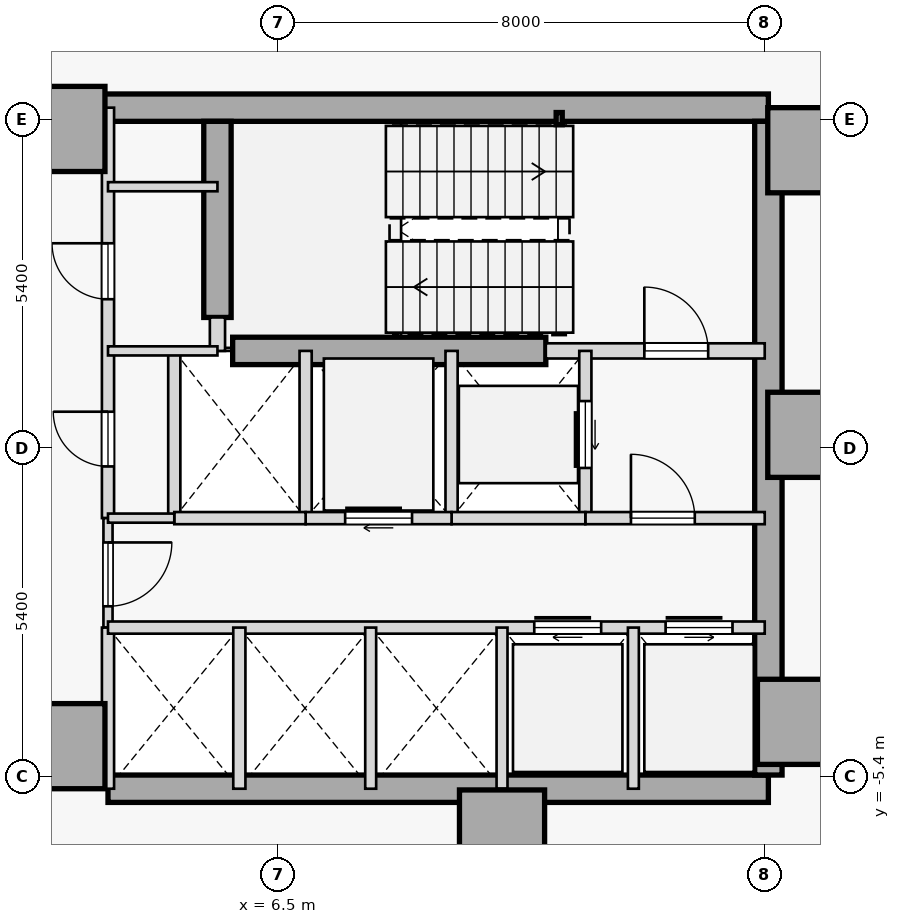
"""IFC4 building model, lengths in metres.
Left out: names, types, materials, properties, quantities, classifications, styles, units other than length and angle.
Written with IfcOpenShell. Run it as: python <this file> out.ifc"""

import sys

from ifc_helpers import new_model, si_unit, direction, frame, frame_2d, origin, origin_2d, place, context, subcontext, project, spatial, rectangle, hollow_rectangle, extrude, element, fill, save


model = new_model("IFC4")
c1 = context("Model", 3, precision=1e-05, world=origin(), true_north=direction((0.0, 1.0)))
c2 = subcontext(c1, "Body", "Model", "MODEL_VIEW")
j1 = project(units=[si_unit("LENGTHUNIT", "METRE"), si_unit("PLANEANGLEUNIT", "RADIAN")], contexts=[c1])
p1 = place(None, origin())
s1 = spatial("IfcSite", under=j1, at=p1, CompositionType="ELEMENT")
p2 = place(p1, origin())
s2 = spatial("IfcBuilding", under=s1, at=p2, CompositionType="ELEMENT")
p3 = place(p2, frame((0.0, 0.0, 21.8)))
s3 = spatial("IfcBuildingStorey", under=s2, at=p3, CompositionType="ELEMENT", Elevation=21.8)
for number, where, z_axis, x_axis in (
    (1, (15.25, 4.9, 0.0), (0.0, 0.0, 1.0), (1.0, 0.0, 0.0)),
    (2, (15.25, 0.22, 0.0), (0.0, 0.0, 1.0), (1.0, 0.0, 0.0)),
    (3, (15.08, -4.5, 0.0), (0.0, 0.0, 1.0), (1.0, 0.0, 0.0)),
    (4, (10.18, -6.32, 0.0), (0.0, 0.0, 1.0), (1.0, 0.0, 0.0)),
    (5, (2.95, -4.9, 0.0), (0.0, 0.0, 1.0), (1.0, 0.0, 0.0)),
    (6, (2.95, 5.25, 0.0), (0.0, 0.0, 1.0), (1.0, 0.0, 0.0)),
):
    element("IfcColumn", number, at=place(p3, frame(where, z_axis=z_axis, x_axis=x_axis)), inside=s3, PredefinedType="COLUMN", context=c2, shape_type="SweptSolid", body=[
        extrude(rectangle(XDim=1.4, YDim=1.4, at=origin_2d()), origin(), (0.0, 0.0, 1.0), 3.8),
    ])
p4 = place(p3, frame((3.15, 5.6, 0.0), z_axis=(0.0, 0.0, 1.0), x_axis=(1.0, 0.0, 0.0)))
e7 = element("IfcWall", 7, at=p4, inside=s3, PredefinedType="SHEAR", context=c2, shape_type="SweptSolid", body=[
    extrude(rectangle(XDim=11.41, YDim=0.45, at=frame_2d((5.705, 0.0))), origin(), (0.0, 0.0, 1.0), 3.575),
])
p5 = place(p3, frame((3.7, -5.6, 0.0), z_axis=(0.0, 0.0, 1.0), x_axis=(1.0, 0.0, 0.0)))
e8 = element("IfcWall", 8, at=p5, inside=s3, PredefinedType="SHEAR", context=c2, shape_type="SweptSolid", body=[
    extrude(rectangle(XDim=10.86, YDim=0.45, at=frame_2d((5.43, 0.0))), origin(), (0.0, 0.0, 1.0), 3.575),
])
p6 = place(p3, frame((14.56, -5.375, 0.0), z_axis=(0.0, 0.0, 1.0), x_axis=(0.0, 1.0, 0.0)))
e9 = element("IfcWall", 9, at=p6, inside=s3, PredefinedType="SHEAR", context=c2, shape_type="SweptSolid", body=[
    extrude(rectangle(XDim=10.75, YDim=0.45, at=frame_2d((5.375, 0.0))), origin(), (0.0, 0.0, 1.0), 3.575),
])
p7 = place(p3, frame((5.5, 2.15, 0.0), z_axis=(0.0, 0.0, 1.0), x_axis=(0.0, 1.0, 0.0)))
e10 = element("IfcWall", 10, at=p7, inside=s3, PredefinedType="SHEAR", context=c2, shape_type="SweptSolid", body=[
    extrude(rectangle(XDim=3.225, YDim=0.45, at=frame_2d((1.613, 0.0))), origin(), (0.0, 0.0, 1.0), 3.575),
])
p8 = place(p3, frame((5.75, 1.6, 0.0), z_axis=(0.0, 0.0, 1.0), x_axis=(1.0, 0.0, 0.0)))
e11 = element("IfcWall", 11, at=p8, inside=s3, PredefinedType="SHEAR", context=c2, shape_type="SweptSolid", body=[
    extrude(rectangle(XDim=5.15, YDim=0.45, at=frame_2d((2.575, 0.0))), origin(), (0.0, 0.0, 1.0), 3.575),
])
p9 = place(p3, frame((11.12, 5.42, 0.0), z_axis=(0.0, 0.0, 1.0), x_axis=(1.0, 0.0, 0.0)))
e12 = element("IfcColumn", 12, at=p9, inside=s3, PredefinedType="COLUMN", context=c2, shape_type="SweptSolid", body=[
    extrude(hollow_rectangle(XDim=0.1, YDim=0.2, WallThickness=0.008, at=origin_2d()), origin(), (0.0, 0.0, 1.0), 3.8),
])
p10 = place(p3, frame((10.9, 1.6, 0.0), z_axis=(0.0, 0.0, 1.0), x_axis=(1.0, 0.0, 0.0)))
e13 = element("IfcWall", 13, at=p10, inside=s3, PredefinedType="STANDARD", context=c2, shape_type="SweptSolid", body=[
    extrude(rectangle(XDim=3.6, YDim=0.25, at=frame_2d((1.8, 0.0))), origin(), (0.0, 0.0, 1.0), 3.575),
])
p11 = place(p10, frame((1.62, 0.0, 0.0)))
e14 = element("IfcOpeningElement", 14, at=p11, cuts=e13, PredefinedType="OPENING", context=c2, shape_type="SweptSolid", body=[
    extrude(rectangle(XDim=1.05, YDim=2.15, at=frame_2d((0.525, 1.075))), frame((0.0, 0.135, 0.0), z_axis=(0.0, -1.0, 0.0), x_axis=(1.0, 0.0, 0.0)), (0.0, 0.0, 1.0), 0.27),
])
p12 = place(p3, frame((5.5, 1.6, 0.0), z_axis=(0.0, 0.0, 1.0), x_axis=(0.0, 1.0, 0.0)))
e15 = element("IfcWall", 15, at=p12, inside=s3, PredefinedType="STANDARD", context=c2, shape_type="SweptSolid", body=[
    extrude(rectangle(XDim=0.55, YDim=0.25, at=frame_2d((0.275, 0.0))), origin(), (0.0, 0.0, 1.0), 3.575),
])
p13 = place(p3, frame((3.7, -1.15, 0.0), z_axis=(0.0, 0.0, 1.0), x_axis=(0.0, 1.0, 0.0)))
e16 = element("IfcWall", 16, at=p13, inside=s3, PredefinedType="STANDARD", context=c2, shape_type="SweptSolid", body=[
    extrude(rectangle(XDim=6.75, YDim=0.2, at=frame_2d((3.375, 0.0))), origin(), (0.0, 0.0, 1.0), 3.575),
])
p14 = place(p13, frame((3.6, 0.0, 0.0)))
e17 = element("IfcOpeningElement", 17, at=p14, cuts=e16, PredefinedType="OPENING", context=c2, shape_type="SweptSolid", body=[
    extrude(rectangle(XDim=0.92, YDim=2.15, at=frame_2d((0.46, 1.075))), frame((0.0, 0.11, 0.0), z_axis=(0.0, -1.0, 0.0), x_axis=(1.0, 0.0, 0.0)), (0.0, 0.0, 1.0), 0.22),
])
p15 = place(p13, frame((0.85, 0.0, 0.0)))
e18 = element("IfcOpeningElement", 18, at=p15, cuts=e16, PredefinedType="OPENING", context=c2, shape_type="SweptSolid", body=[
    extrude(rectangle(XDim=0.9, YDim=2.15, at=frame_2d((0.45, 1.075))), frame((0.0, 0.11, 0.0), z_axis=(0.0, -1.0, 0.0), x_axis=(1.0, 0.0, 0.0)), (0.0, 0.0, 1.0), 0.22),
])
p16 = place(p3, frame((3.7, -2.95, 0.0), z_axis=(0.0, 0.0, 1.0), x_axis=(0.0, 1.0, 0.0)))
e19 = element("IfcWall", 19, at=p16, inside=s3, PredefinedType="PARTITIONING", context=c2, shape_type="SweptSolid", body=[
    extrude(rectangle(XDim=1.8, YDim=0.15, at=frame_2d((0.9, 0.0))), origin(), (0.0, 0.0, 1.0), 3.575),
])
p17 = place(p16, frame((0.35, 0.0, 0.0)))
e20 = element("IfcOpeningElement", 20, at=p17, cuts=e19, PredefinedType="OPENING", context=c2, shape_type="SweptSolid", body=[
    extrude(rectangle(XDim=1.05, YDim=2.18, at=frame_2d((0.525, 1.09))), frame((0.0, 0.085, 0.0), z_axis=(0.0, -1.0, 0.0), x_axis=(1.0, 0.0, 0.0)), (0.0, 0.0, 1.0), 0.17),
])
p18 = place(p3, frame((3.7, -5.6, 0.0), z_axis=(0.0, 0.0, 1.0), x_axis=(0.0, 1.0, 0.0)))
e21 = element("IfcWall", 21, at=p18, inside=s3, PredefinedType="STANDARD", context=c2, shape_type="SweptSolid", body=[
    extrude(rectangle(XDim=2.65, YDim=0.2, at=frame_2d((1.325, 0.0))), origin(), (0.0, 0.0, 1.0), 3.575),
])
p19 = place(p3, frame((11.55, -1.15, 0.0), z_axis=(0.0, 0.0, 1.0), x_axis=(0.0, 1.0, 0.0)))
e22 = element("IfcWall", 22, at=p19, inside=s3, PredefinedType="STANDARD", context=c2, shape_type="SweptSolid", body=[
    extrude(rectangle(XDim=2.75, YDim=0.2, at=frame_2d((1.375, 0.0))), origin(), (0.0, 0.0, 1.0), 3.575),
])
p20 = place(p19, frame((0.825, 0.0, 0.0)))
e23 = element("IfcOpeningElement", 23, at=p20, cuts=e22, PredefinedType="OPENING", context=c2, shape_type="SweptSolid", body=[
    extrude(rectangle(XDim=1.1, YDim=2.15, at=frame_2d((0.55, 1.075))), frame((0.0, 0.11, 0.0), z_axis=(0.0, -1.0, 0.0), x_axis=(1.0, 0.0, 0.0)), (0.0, 0.0, 1.0), 0.22),
])
p21 = place(p3, frame((9.35, -1.15, 0.0), z_axis=(0.0, 0.0, 1.0), x_axis=(0.0, 1.0, 0.0)))
e24 = element("IfcWall", 24, at=p21, inside=s3, PredefinedType="STANDARD", context=c2, shape_type="SweptSolid", body=[
    extrude(rectangle(XDim=2.75, YDim=0.2, at=frame_2d((1.375, 0.0))), origin(), (0.0, 0.0, 1.0), 3.575),
])
p22 = place(p3, frame((11.55, -1.15, 0.0), z_axis=(0.0, 0.0, 1.0), x_axis=(1.0, 0.0, 0.0)))
e25 = element("IfcWall", 25, at=p22, inside=s3, PredefinedType="STANDARD", context=c2, shape_type="SweptSolid", body=[
    extrude(rectangle(XDim=2.95, YDim=0.2, at=frame_2d((1.475, 0.0))), origin(), (0.0, 0.0, 1.0), 3.575),
])
p23 = place(p22, frame((0.75, 0.0, 0.0)))
e26 = element("IfcOpeningElement", 26, at=p23, cuts=e25, PredefinedType="OPENING", context=c2, shape_type="SweptSolid", body=[
    extrude(rectangle(XDim=1.05, YDim=2.18, at=frame_2d((0.525, 1.09))), frame((0.0, 0.11, 0.0), z_axis=(0.0, -1.0, 0.0), x_axis=(1.0, 0.0, 0.0)), (0.0, 0.0, 1.0), 0.22),
])
p24 = place(p3, frame((9.35, -1.15, 0.0), z_axis=(0.0, 0.0, 1.0), x_axis=(1.0, 0.0, 0.0)))
e27 = element("IfcWall", 27, at=p24, inside=s3, PredefinedType="STANDARD", context=c2, shape_type="SweptSolid", body=[
    extrude(rectangle(XDim=2.2, YDim=0.2, at=frame_2d((1.1, 0.0))), origin(), (0.0, 0.0, 1.0), 3.575),
])
p25 = place(p3, frame((6.95, -1.15, 0.0), z_axis=(0.0, 0.0, 1.0), x_axis=(0.0, 1.0, 0.0)))
e28 = element("IfcWall", 28, at=p25, inside=s3, PredefinedType="STANDARD", context=c2, shape_type="SweptSolid", body=[
    extrude(rectangle(XDim=2.75, YDim=0.2, at=frame_2d((1.375, 0.0))), origin(), (0.0, 0.0, 1.0), 3.575),
])
p26 = place(p3, frame((6.95, -1.15, 0.0), z_axis=(0.0, 0.0, 1.0), x_axis=(1.0, 0.0, 0.0)))
e29 = element("IfcWall", 29, at=p26, inside=s3, PredefinedType="STANDARD", context=c2, shape_type="SweptSolid", body=[
    extrude(rectangle(XDim=2.4, YDim=0.2, at=frame_2d((1.2, 0.0))), origin(), (0.0, 0.0, 1.0), 3.575),
])
p27 = place(p26, frame((0.65, 0.0, 0.0)))
e30 = element("IfcOpeningElement", 30, at=p27, cuts=e29, PredefinedType="OPENING", context=c2, shape_type="SweptSolid", body=[
    extrude(rectangle(XDim=1.1, YDim=2.15, at=frame_2d((0.55, 1.075))), frame((0.0, 0.11, 0.0), z_axis=(0.0, -1.0, 0.0), x_axis=(1.0, 0.0, 0.0)), (0.0, 0.0, 1.0), 0.22),
])
p28 = place(p3, frame((4.79, -1.15, 0.0), z_axis=(0.0, 0.0, 1.0), x_axis=(0.0, 1.0, 0.0)))
e31 = element("IfcWall", 31, at=p28, inside=s3, PredefinedType="STANDARD", context=c2, shape_type="SweptSolid", body=[
    extrude(rectangle(XDim=2.75, YDim=0.2, at=frame_2d((1.375, 0.0))), origin(), (0.0, 0.0, 1.0), 3.575),
])
p29 = place(p3, frame((4.79, -1.15, 0.0), z_axis=(0.0, 0.0, 1.0), x_axis=(1.0, 0.0, 0.0)))
e32 = element("IfcWall", 32, at=p29, inside=s3, PredefinedType="STANDARD", context=c2, shape_type="SweptSolid", body=[
    extrude(rectangle(XDim=2.16, YDim=0.2, at=frame_2d((1.08, 0.0))), origin(), (0.0, 0.0, 1.0), 3.575),
])
p30 = place(p3, frame((3.7, -1.15, 0.0), z_axis=(0.0, 0.0, 1.0), x_axis=(1.0, 0.0, 0.0)))
e33 = element("IfcWall", 33, at=p30, inside=s3, PredefinedType="PARTITIONING", context=c2, shape_type="SweptSolid", body=[
    extrude(rectangle(XDim=1.09, YDim=0.15, at=frame_2d((0.545, 0.0))), origin(), (0.0, 0.0, 1.0), 3.575),
])
p31 = place(p3, frame((3.7, -2.95, 0.0), z_axis=(0.0, 0.0, 1.0), x_axis=(1.0, 0.0, 0.0)))
e34 = element("IfcWall", 34, at=p31, inside=s3, PredefinedType="STANDARD", context=c2, shape_type="SweptSolid", body=[
    extrude(rectangle(XDim=10.8, YDim=0.2, at=frame_2d((5.4, 0.0))), origin(), (0.0, 0.0, 1.0), 3.575),
])
p32 = place(p31, frame((7.01, 0.0, 0.0)))
e35 = element("IfcOpeningElement", 35, at=p32, cuts=e34, PredefinedType="OPENING", context=c2, shape_type="SweptSolid", body=[
    extrude(rectangle(XDim=1.1, YDim=2.15, at=frame_2d((0.55, 1.075))), frame((0.0, 0.11, 0.0), z_axis=(0.0, -1.0, 0.0), x_axis=(1.0, 0.0, 0.0)), (0.0, 0.0, 1.0), 0.22),
])
p33 = place(p31, frame((9.17, 0.0, 0.0)))
e36 = element("IfcOpeningElement", 36, at=p33, cuts=e34, PredefinedType="OPENING", context=c2, shape_type="SweptSolid", body=[
    extrude(rectangle(XDim=1.1, YDim=2.15, at=frame_2d((0.55, 1.075))), frame((0.0, 0.11, 0.0), z_axis=(0.0, -1.0, 0.0), x_axis=(1.0, 0.0, 0.0)), (0.0, 0.0, 1.0), 0.22),
])
p34 = place(p3, frame((5.86, -5.6, 0.0), z_axis=(0.0, 0.0, 1.0), x_axis=(0.0, 1.0, 0.0)))
e37 = element("IfcWall", 37, at=p34, inside=s3, PredefinedType="STANDARD", context=c2, shape_type="SweptSolid", body=[
    extrude(rectangle(XDim=2.65, YDim=0.2, at=frame_2d((1.325, 0.0))), origin(), (0.0, 0.0, 1.0), 3.575),
])
for number, where, z_axis, x_axis in (
    (38, (12.34, -5.6, 0.0), (0.0, 0.0, 1.0), (0.0, 1.0, 0.0)),
    (39, (10.18, -5.6, 0.0), (0.0, 0.0, 1.0), (0.0, 1.0, 0.0)),
    (40, (8.02, -5.6, 0.0), (0.0, 0.0, 1.0), (0.0, 1.0, 0.0)),
):
    element("IfcWall", number, at=place(p3, frame(where, z_axis=z_axis, x_axis=x_axis)), inside=s3, PredefinedType="STANDARD", context=c2, shape_type="SweptSolid", body=[
        extrude(rectangle(XDim=2.65, YDim=0.18, at=frame_2d((1.325, 0.0))), origin(), (0.0, 0.0, 1.0), 3.575),
    ])
for number, where, z_axis, x_axis in (
    (41, (3.7, 4.3, 0.0), (0.0, 0.0, 1.0), (1.0, 0.0, 0.0)),
    (42, (3.7, 1.6, 0.0), (0.0, 0.0, 1.0), (1.0, 0.0, 0.0)),
):
    element("IfcWall", number, at=place(p3, frame(where, z_axis=z_axis, x_axis=x_axis)), inside=s3, PredefinedType="PARTITIONING", context=c2, shape_type="SweptSolid", body=[
        extrude(rectangle(XDim=1.8, YDim=0.15, at=frame_2d((0.9, 0.0))), origin(), (0.0, 0.0, 1.0), 3.575),
    ])
p35 = place(p11, origin())
e43 = element("IfcDoor", 43, at=p35, inside=s3, OperationType="SINGLE_SWING_LEFT", PredefinedType="DOOR", context=c2, shape_type="SweptSolid", body=[
    extrude(rectangle(XDim=1.05, YDim=2.15, at=frame_2d((0.525, 1.075))), frame((0.0, 0.025, 0.0), z_axis=(0.0, -1.0, 0.0), x_axis=(1.0, 0.0, 0.0)), (0.0, 0.0, 1.0), 0.05),
])
fill(e14, e43)
p36 = place(p23, origin())
e44 = element("IfcDoor", 44, at=p36, inside=s3, OperationType="SINGLE_SWING_LEFT", PredefinedType="DOOR", context=c2, shape_type="SweptSolid", body=[
    extrude(rectangle(XDim=1.05, YDim=2.18, at=frame_2d((0.525, 1.09))), frame((0.0, 0.025, 0.0), z_axis=(0.0, -1.0, 0.0), x_axis=(1.0, 0.0, 0.0)), (0.0, 0.0, 1.0), 0.05),
])
fill(e26, e44)
p37 = place(p17, frame((1.05, 0.0, 0.0), z_axis=(0.0, 0.0, 1.0), x_axis=(-1.0, 0.0, 0.0)))
e45 = element("IfcDoor", 45, at=p37, inside=s3, OperationType="SINGLE_SWING_RIGHT", PredefinedType="DOOR", context=c2, shape_type="SweptSolid", body=[
    extrude(rectangle(XDim=1.05, YDim=2.18, at=frame_2d((0.525, 1.09))), frame((0.0, 0.025, 0.0), z_axis=(0.0, -1.0, 0.0), x_axis=(1.0, 0.0, 0.0)), (0.0, 0.0, 1.0), 0.05),
])
fill(e20, e45)
p38 = place(p20, origin())
e46 = element("IfcDoor", 46, at=p38, inside=s3, OperationType="SLIDING_TO_RIGHT", PredefinedType="DOOR", context=c2, shape_type="SweptSolid", body=[
    extrude(rectangle(XDim=1.1, YDim=2.15, at=frame_2d((0.55, 1.075))), frame((0.0, 0.025, 0.0), z_axis=(0.0, -1.0, 0.0), x_axis=(1.0, 0.0, 0.0)), (0.0, 0.0, 1.0), 0.05),
])
fill(e23, e46)
p39 = place(p27, origin())
e47 = element("IfcDoor", 47, at=p39, inside=s3, OperationType="SLIDING_TO_RIGHT", PredefinedType="DOOR", context=c2, shape_type="SweptSolid", body=[
    extrude(rectangle(XDim=1.1, YDim=2.15, at=frame_2d((0.55, 1.075))), frame((0.0, 0.025, 0.0), z_axis=(0.0, -1.0, 0.0), x_axis=(1.0, 0.0, 0.0)), (0.0, 0.0, 1.0), 0.05),
])
fill(e30, e47)
p40 = place(p32, origin())
e48 = element("IfcDoor", 48, at=p40, inside=s3, OperationType="SLIDING_TO_RIGHT", PredefinedType="DOOR", context=c2, shape_type="SweptSolid", body=[
    extrude(rectangle(XDim=1.1, YDim=2.15, at=frame_2d((0.55, 1.075))), frame((0.0, 0.025, 0.0), z_axis=(0.0, -1.0, 0.0), x_axis=(1.0, 0.0, 0.0)), (0.0, 0.0, 1.0), 0.05),
])
fill(e35, e48)
p41 = place(p33, origin())
e49 = element("IfcDoor", 49, at=p41, inside=s3, OperationType="SLIDING_TO_LEFT", PredefinedType="DOOR", context=c2, shape_type="SweptSolid", body=[
    extrude(rectangle(XDim=1.1, YDim=2.15, at=frame_2d((0.55, 1.075))), frame((0.0, 0.025, 0.0), z_axis=(0.0, -1.0, 0.0), x_axis=(1.0, 0.0, 0.0)), (0.0, 0.0, 1.0), 0.05),
])
fill(e36, e49)
p42 = place(p14, origin())
e50 = element("IfcDoor", 50, at=p42, inside=s3, OperationType="SINGLE_SWING_RIGHT", PredefinedType="DOOR", context=c2, shape_type="SweptSolid", body=[
    extrude(rectangle(XDim=0.92, YDim=2.15, at=frame_2d((0.46, 1.075))), frame((0.0, 0.025, 0.0), z_axis=(0.0, -1.0, 0.0), x_axis=(1.0, 0.0, 0.0)), (0.0, 0.0, 1.0), 0.05),
])
fill(e17, e50)
p43 = place(p15, origin())
e51 = element("IfcDoor", 51, at=p43, inside=s3, OperationType="SINGLE_SWING_RIGHT", PredefinedType="DOOR", context=c2, shape_type="SweptSolid", body=[
    extrude(rectangle(XDim=0.9, YDim=2.15, at=frame_2d((0.45, 1.075))), frame((0.0, 0.025, 0.0), z_axis=(0.0, -1.0, 0.0), x_axis=(1.0, 0.0, 0.0)), (0.0, 0.0, 1.0), 0.05),
])
fill(e18, e51)
save(model, sys.argv[1])
